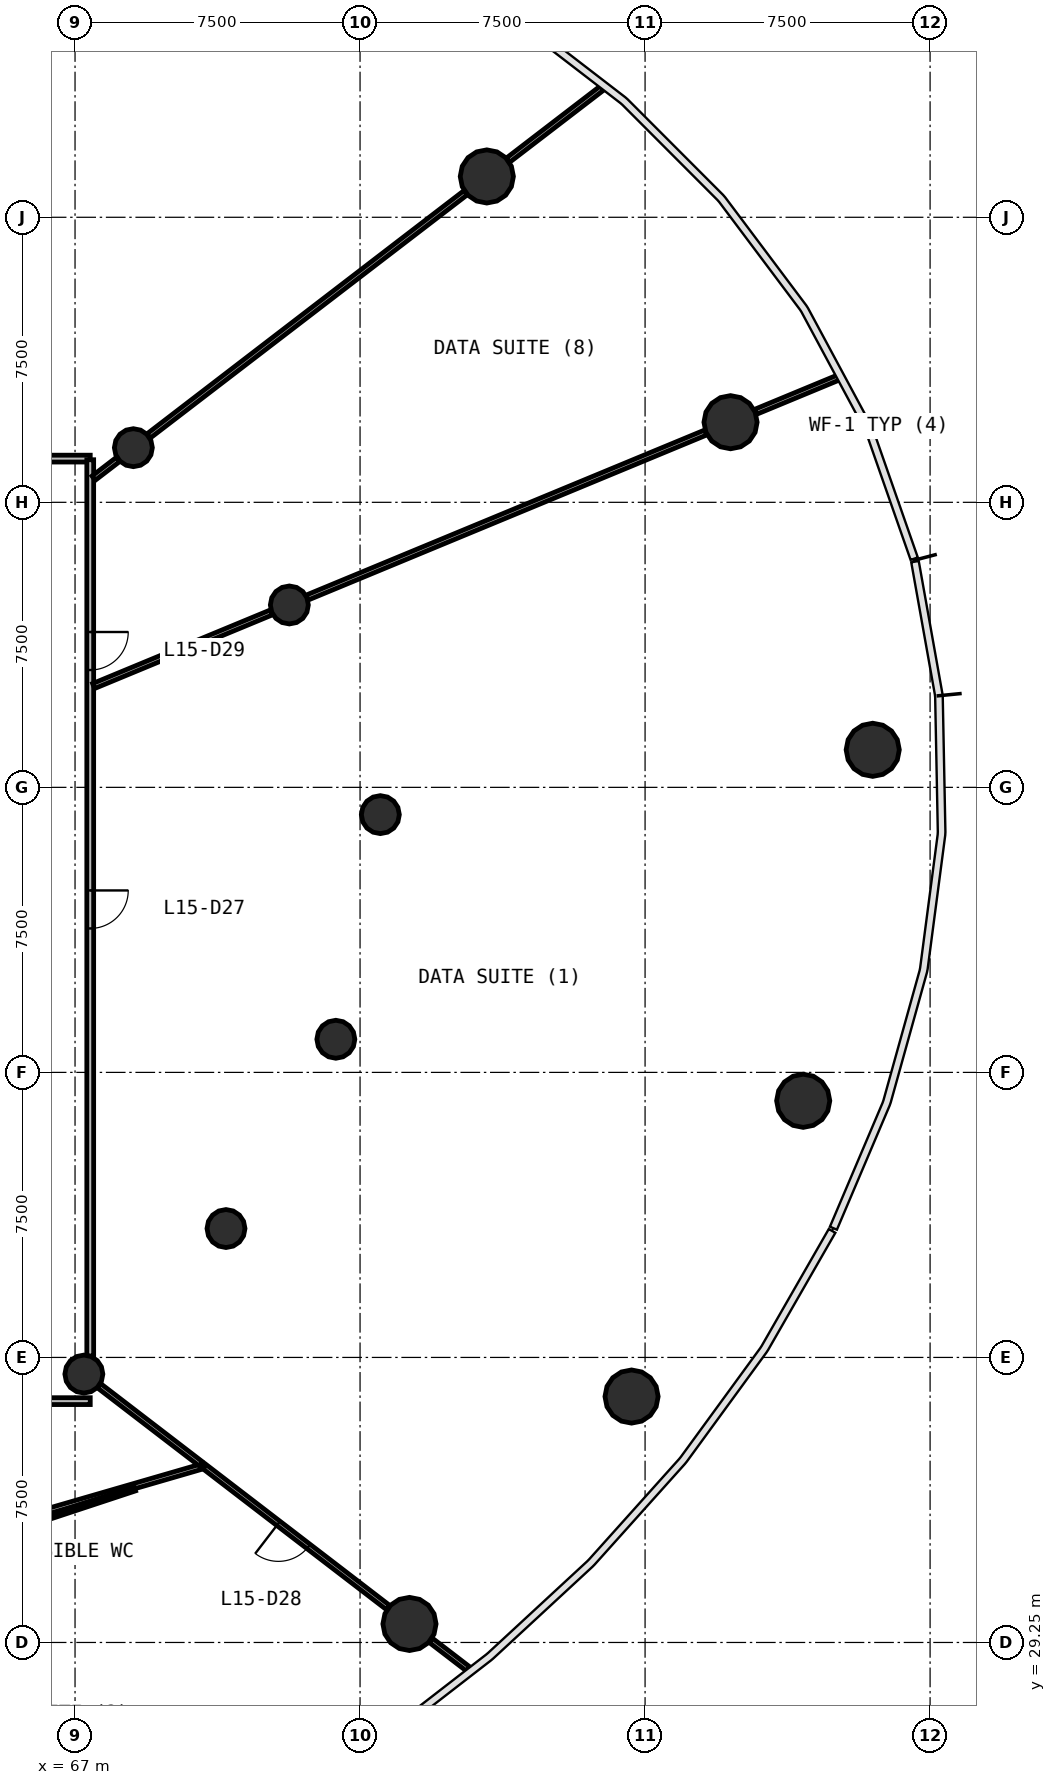
"""IFC4 building model, lengths in metres.
Left out: names, types, materials, properties, quantities, classifications, styles, units other than length and angle.
Written with IfcOpenShell. Run it as: python <this file> out.ifc"""

import sys

from ifc_helpers import new_model, si_unit, direction, frame, frame_2d, origin, origin_2d, place, context, subcontext, project, spatial, rectangle, circle, extrude, source, transform, mapped, element, fill, save


model = new_model("IFC4")
c1 = context("Model", 3, precision=1e-05, world=origin(), true_north=direction((0.0, 1.0)))
c2 = subcontext(c1, "Body", "Model", "MODEL_VIEW")
j1 = project(units=[si_unit("LENGTHUNIT", "METRE"), si_unit("PLANEANGLEUNIT", "RADIAN")], contexts=[c1])
p1 = place(None, origin())
s1 = spatial("IfcSite", under=j1, at=p1, CompositionType="ELEMENT")
p2 = place(p1, origin())
s2 = spatial("IfcBuilding", under=s1, at=p2, CompositionType="ELEMENT")
p3 = place(p2, frame((0.0, 0.0, 66.6)))
s3 = spatial("IfcBuildingStorey", under=s2, at=p3, CompositionType="ELEMENT", Elevation=66.6)
m1 = source(origin(), c2, "Body", "SweptSolid", [
    extrude(circle(Radius=0.7, at=origin_2d()), origin(), (0.0, 0.0, 1.0), 4.4),
])
for number, where, z_axis, x_axis in (
    (1, (87.99, 52.738, 0.0), (0.0, 0.0, 1.0), (1.0, 0.0, 0.0)),
    (2, (84.249, 61.358, 0.0), (0.0, 0.0, 1.0), (1.0, 0.0, 0.0)),
    (3, (77.836, 67.824, 0.0), (0.0, 0.0, 1.0), (1.0, 0.0, 0.0)),
    (4, (75.801, 29.737, 0.0), (0.0, 0.0, 1.0), (1.0, 0.0, 0.0)),
    (5, (81.645, 35.721, 0.0), (0.0, 0.0, 1.0), (1.0, 0.0, 0.0)),
    (6, (86.161, 43.503, 0.0), (0.0, 0.0, 1.0), (1.0, 0.0, 0.0)),
):
    element("IfcColumn", number, at=place(p3, frame(where, z_axis=z_axis, x_axis=x_axis)), inside=s3, PredefinedType="COLUMN", context=c2, shape_type="MappedRepresentation", body=[
        mapped(m1, transform((0.0, 0.0, 0.0), scale=1.0)),
    ])
m2 = source(origin(), c2, "Body", "SweptSolid", [
    extrude(circle(Radius=0.5, at=origin_2d()), origin(), (0.0, 0.0, 1.0), 4.4),
])
for number, where, z_axis, x_axis in (
    (7, (75.034, 51.032, 0.0), (0.0, 0.0, 1.0), (1.0, 0.0, 0.0)),
    (8, (72.639, 56.549, 0.0), (0.0, 0.0, 1.0), (1.0, 0.0, 0.0)),
    (9, (68.535, 60.688, 0.0), (0.0, 0.0, 1.0), (1.0, 0.0, 0.0)),
    (10, (67.232, 36.312, 0.0), (0.0, 0.0, 1.0), (1.0, 0.0, 0.0)),
    (11, (70.972, 40.141, 0.0), (0.0, 0.0, 1.0), (1.0, 0.0, 0.0)),
    (12, (73.863, 45.122, 0.0), (0.0, 0.0, 1.0), (1.0, 0.0, 0.0)),
):
    element("IfcColumn", number, at=place(p3, frame(where, z_axis=z_axis, x_axis=x_axis)), inside=s3, PredefinedType="COLUMN", context=c2, shape_type="MappedRepresentation", body=[
        mapped(m2, transform((0.0, 0.0, 0.0), scale=1.0)),
    ])
p4 = place(p3, frame((67.4, 35.6, 0.0), z_axis=(0.0, 0.0, 1.0), x_axis=(-1.0, 0.0, 0.0)))
e13 = element("IfcWall", 13, at=p4, inside=s3, PredefinedType="PARTITIONING", context=c2, shape_type="SweptSolid", body=[
    extrude(rectangle(XDim=30.8, YDim=0.18, at=frame_2d((15.4, 0.0))), origin(), (0.0, 0.0, 1.0), 3.05),
])
p5 = place(p4, frame((9.05, 0.0, 0.0)))
e14 = element("IfcOpeningElement", 14, at=p5, cuts=e13, PredefinedType="OPENING", context=c2, shape_type="SweptSolid", body=[
    extrude(rectangle(XDim=0.9, YDim=2.1, at=frame_2d((0.45, 1.05))), frame((0.0, 0.1, 0.0), z_axis=(0.0, -1.0, 0.0), x_axis=(1.0, 0.0, 0.0)), (0.0, 0.0, 1.0), 0.2),
])
p6 = place(p4, frame((6.05, 0.0, 0.0)))
e15 = element("IfcOpeningElement", 15, at=p6, cuts=e13, PredefinedType="OPENING", context=c2, shape_type="SweptSolid", body=[
    extrude(rectangle(XDim=0.9, YDim=2.1, at=frame_2d((0.45, 1.05))), frame((0.0, 0.1, 0.0), z_axis=(0.0, -1.0, 0.0), x_axis=(1.0, 0.0, 0.0)), (0.0, 0.0, 1.0), 0.2),
])
p7 = place(p4, frame((2.45, 0.0, 0.0)))
e16 = element("IfcOpeningElement", 16, at=p7, cuts=e13, PredefinedType="OPENING", context=c2, shape_type="SweptSolid", body=[
    extrude(rectangle(XDim=0.9, YDim=2.1, at=frame_2d((0.45, 1.05))), frame((0.0, 0.1, 0.0), z_axis=(0.0, -1.0, 0.0), x_axis=(1.0, 0.0, 0.0)), (0.0, 0.0, 1.0), 0.2),
])
p8 = place(p4, frame((14.95, 0.0, 0.0)))
e17 = element("IfcOpeningElement", 17, at=p8, cuts=e13, PredefinedType="OPENING", context=c2, shape_type="SweptSolid", body=[
    extrude(rectangle(XDim=1.0, YDim=2.1, at=frame_2d((0.5, 1.05))), frame((0.0, 0.1, 0.0), z_axis=(0.0, -1.0, 0.0), x_axis=(1.0, 0.0, 0.0)), (0.0, 0.0, 1.0), 0.2),
])
p9 = place(p3, frame((36.6, 60.4, 0.0), z_axis=(0.0, 0.0, 1.0), x_axis=(1.0, 0.0, 0.0)))
e18 = element("IfcWall", 18, at=p9, inside=s3, PredefinedType="PARTITIONING", context=c2, shape_type="SweptSolid", body=[
    extrude(rectangle(XDim=30.8, YDim=0.18, at=frame_2d((15.4, 0.0))), origin(), (0.0, 0.0, 1.0), 3.05),
])
p10 = place(p9, frame((17.35, 0.0, 0.0)))
e19 = element("IfcOpeningElement", 19, at=p10, cuts=e18, PredefinedType="OPENING", context=c2, shape_type="SweptSolid", body=[
    extrude(rectangle(XDim=1.0, YDim=2.1, at=frame_2d((0.5, 1.05))), frame((0.0, 0.1, 0.0), z_axis=(0.0, -1.0, 0.0), x_axis=(1.0, 0.0, 0.0)), (0.0, 0.0, 1.0), 0.2),
])
p11 = place(p9, frame((14.95, 0.0, 0.0)))
e20 = element("IfcOpeningElement", 20, at=p11, cuts=e18, PredefinedType="OPENING", context=c2, shape_type="SweptSolid", body=[
    extrude(rectangle(XDim=1.0, YDim=2.1, at=frame_2d((0.5, 1.05))), frame((0.0, 0.1, 0.0), z_axis=(0.0, -1.0, 0.0), x_axis=(1.0, 0.0, 0.0)), (0.0, 0.0, 1.0), 0.2),
])
p12 = place(p9, frame((8.95, 0.0, 0.0)))
e21 = element("IfcOpeningElement", 21, at=p12, cuts=e18, PredefinedType="OPENING", context=c2, shape_type="SweptSolid", body=[
    extrude(rectangle(XDim=1.0, YDim=2.1, at=frame_2d((0.5, 1.05))), frame((0.0, 0.1, 0.0), z_axis=(0.0, -1.0, 0.0), x_axis=(1.0, 0.0, 0.0)), (0.0, 0.0, 1.0), 0.2),
])
p13 = place(p3, frame((67.4, 60.37, 0.0), z_axis=(0.0, 0.0, 1.0), x_axis=(0.0, -1.0, 0.0)))
e22 = element("IfcWall", 22, at=p13, inside=s3, PredefinedType="PARTITIONING", context=c2, shape_type="SweptSolid", body=[
    extrude(rectangle(XDim=23.583, YDim=0.18, at=frame_2d((11.791, 0.0))), origin(), (0.0, 0.0, 1.0), 3.05),
])
p14 = place(p13, frame((11.333, 0.0, 0.0)))
e23 = element("IfcOpeningElement", 23, at=p14, cuts=e22, PredefinedType="OPENING", context=c2, shape_type="SweptSolid", body=[
    extrude(rectangle(XDim=1.0, YDim=2.1, at=frame_2d((0.5, 1.05))), frame((0.0, 0.1, 0.0), z_axis=(0.0, -1.0, 0.0), x_axis=(1.0, 0.0, 0.0)), (0.0, 0.0, 1.0), 0.2),
])
p15 = place(p13, frame((4.532, 0.0, 0.0)))
e24 = element("IfcOpeningElement", 24, at=p15, cuts=e22, PredefinedType="OPENING", context=c2, shape_type="SweptSolid", body=[
    extrude(rectangle(XDim=1.0, YDim=2.1, at=frame_2d((0.5, 1.05))), frame((0.0, 0.1, 0.0), z_axis=(0.0, -1.0, 0.0), x_axis=(1.0, 0.0, 0.0)), (0.0, 0.0, 1.0), 0.2),
])
p16 = place(p3, frame((73.106, 56.742, 0.0), z_axis=(0.0, 0.0, 1.0), x_axis=(0.923875075531, 0.382694192291, 0.0)))
e25 = element("IfcWall", 25, at=p16, inside=s3, PredefinedType="PARTITIONING", context=c2, shape_type="SweptSolid", body=[
    extrude(rectangle(XDim=11.356, YDim=0.14, at=frame_2d((5.678, 0.0))), origin(), (0.0, 0.0, 1.0), 3.05),
])
p17 = place(p3, frame((68.935, 60.995, 0.0), z_axis=(0.0, 0.0, 1.0), x_axis=(0.793353660174, 0.608761012129, 0.0)))
e26 = element("IfcWall", 26, at=p17, inside=s3, PredefinedType="PARTITIONING", context=c2, shape_type="SweptSolid", body=[
    extrude(rectangle(XDim=10.515, YDim=0.14, at=frame_2d((5.257, 0.0))), origin(), (0.0, 0.0, 1.0), 3.05),
])
p18 = place(p3, frame((64.201, 32.1, 0.0), z_axis=(0.0, 0.0, 1.0), x_axis=(0.96039403273, 0.278645477079, 0.0)))
e27 = element("IfcWall", 27, at=p18, inside=s3, PredefinedType="PARTITIONING", context=c2, shape_type="SweptSolid", body=[
    extrude(rectangle(XDim=6.438, YDim=0.14, at=frame_2d((3.219, 0.0))), origin(), (0.0, 0.0, 1.0), 3.05),
])
p19 = place(p3, frame((75.242, 30.166, 0.0), z_axis=(0.0, 0.0, 1.0), x_axis=(-0.793369627486, 0.608740202535, 0.0)))
e28 = element("IfcWall", 28, at=p19, inside=s3, PredefinedType="PARTITIONING", context=c2, shape_type="SweptSolid", body=[
    extrude(rectangle(XDim=6.093, YDim=0.14, at=frame_2d((3.047, 0.0))), origin(), (0.0, 0.0, 1.0), 3.05),
])
p20 = place(p19, frame((2.643, 0.0, 0.0)))
e29 = element("IfcOpeningElement", 29, at=p20, cuts=e28, PredefinedType="OPENING", context=c2, shape_type="SweptSolid", body=[
    extrude(rectangle(XDim=1.0, YDim=2.1, at=frame_2d((0.5, 1.05))), frame((0.0, 0.08, 0.0), z_axis=(0.0, -1.0, 0.0), x_axis=(1.0, 0.0, 0.0)), (0.0, 0.0, 1.0), 0.16),
])
p21 = place(p3, frame((67.49, 54.416, 0.0), z_axis=(0.0, 0.0, 1.0), x_axis=(0.923890025086, 0.382658100067, 0.0)))
e30 = element("IfcWall", 30, at=p21, inside=s3, PredefinedType="PARTITIONING", context=c2, shape_type="SweptSolid", body=[
    extrude(rectangle(XDim=5.068, YDim=0.14, at=frame_2d((2.534, 0.0))), origin(), (0.0, 0.0, 1.0), 3.05),
])
p22 = place(p3, frame((67.633, 36.005, 0.0), z_axis=(0.0, 0.0, 1.0), x_axis=(0.793340144607, -0.608778625574, 0.0)))
e31 = element("IfcWall", 31, at=p22, inside=s3, PredefinedType="PARTITIONING", context=c2, shape_type="SweptSolid", body=[
    extrude(rectangle(XDim=3.381, YDim=0.14, at=frame_2d((1.69, 0.0))), origin(), (0.0, 0.0, 1.0), 3.05),
])
p23 = place(p3, frame((78.394, 68.253, 0.0), z_axis=(0.0, 0.0, 1.0), x_axis=(0.793391027205, 0.608712311319, 0.0)))
e32 = element("IfcWall", 32, at=p23, inside=s3, PredefinedType="PARTITIONING", context=c2, shape_type="SweptSolid", body=[
    extrude(rectangle(XDim=3.121, YDim=0.14, at=frame_2d((1.561, 0.0))), origin(), (0.0, 0.0, 1.0), 3.05),
])
p24 = place(p3, frame((84.9, 61.628, 0.0), z_axis=(0.0, 0.0, 1.0), x_axis=(0.923877154041, 0.38268917445, 0.0)))
e33 = element("IfcWall", 33, at=p24, inside=s3, PredefinedType="PARTITIONING", context=c2, shape_type="SweptSolid", body=[
    extrude(rectangle(XDim=2.386, YDim=0.14, at=frame_2d((1.193, 0.0))), origin(), (0.0, 0.0, 1.0), 3.05),
])
p25 = place(p3, frame((76.359, 29.309, 0.0), z_axis=(0.0, 0.0, 1.0), x_axis=(0.793287286722, -0.608847502028, 0.0)))
e34 = element("IfcWall", 34, at=p25, inside=s3, PredefinedType="PARTITIONING", context=c2, shape_type="SweptSolid", body=[
    extrude(rectangle(XDim=1.244, YDim=0.14, at=frame_2d((0.622, 0.0))), origin(), (0.0, 0.0, 1.0), 3.05),
])
p26 = place(p3, frame((67.49, 59.886, 0.0), z_axis=(0.0, 0.0, 1.0), x_axis=(0.793316076519, 0.608809989025, 0.0)))
e35 = element("IfcWall", 35, at=p26, inside=s3, PredefinedType="PARTITIONING", context=c2, shape_type="SweptSolid", body=[
    extrude(rectangle(XDim=0.812, YDim=0.14, at=frame_2d((0.406, 0.0))), origin(), (0.0, 0.0, 1.0), 3.05),
])
p27 = place(p3, frame((66.195, 32.51, 0.0), z_axis=(0.0, 0.0, 1.0), x_axis=(0.949518091393, 0.313712279195, 0.0)))
e36 = element("IfcWall", 36, at=p27, inside=s3, PredefinedType="PARTITIONING", context=c2, shape_type="SweptSolid", body=[
    extrude(rectangle(XDim=2.505, YDim=0.12, at=frame_2d((1.252, 0.0))), origin(), (0.0, 0.0, 1.0), 3.05),
])
m3 = source(origin(), c2, "Body", "SweptSolid", [
    extrude(rectangle(XDim=1.0, YDim=2.1, at=frame_2d((0.5, 1.05))), frame((0.0, 0.025, 0.0), z_axis=(0.0, -1.0, 0.0), x_axis=(1.0, 0.0, 0.0)), (0.0, 0.0, 1.0), 0.05),
])
p28 = place(p14, origin())
e37 = element("IfcDoor", 37, at=p28, inside=s3, OperationType="SINGLE_SWING_LEFT", PredefinedType="DOOR", context=c2, shape_type="MappedRepresentation", body=[
    mapped(m3, transform((0.0, 0.0, 0.0), scale=1.0)),
])
fill(e23, e37)
p29 = place(p20, origin())
e38 = element("IfcDoor", 38, at=p29, inside=s3, OperationType="SINGLE_SWING_RIGHT", PredefinedType="DOOR", context=c2, shape_type="MappedRepresentation", body=[
    mapped(m3, transform((0.0, 0.0, 0.0), scale=1.0)),
])
fill(e29, e38)
p30 = place(p15, origin())
e39 = element("IfcDoor", 39, at=p30, inside=s3, OperationType="SINGLE_SWING_LEFT", PredefinedType="DOOR", context=c2, shape_type="MappedRepresentation", body=[
    mapped(m3, transform((0.0, 0.0, 0.0), scale=1.0)),
])
fill(e24, e39)
save(model, sys.argv[1])
